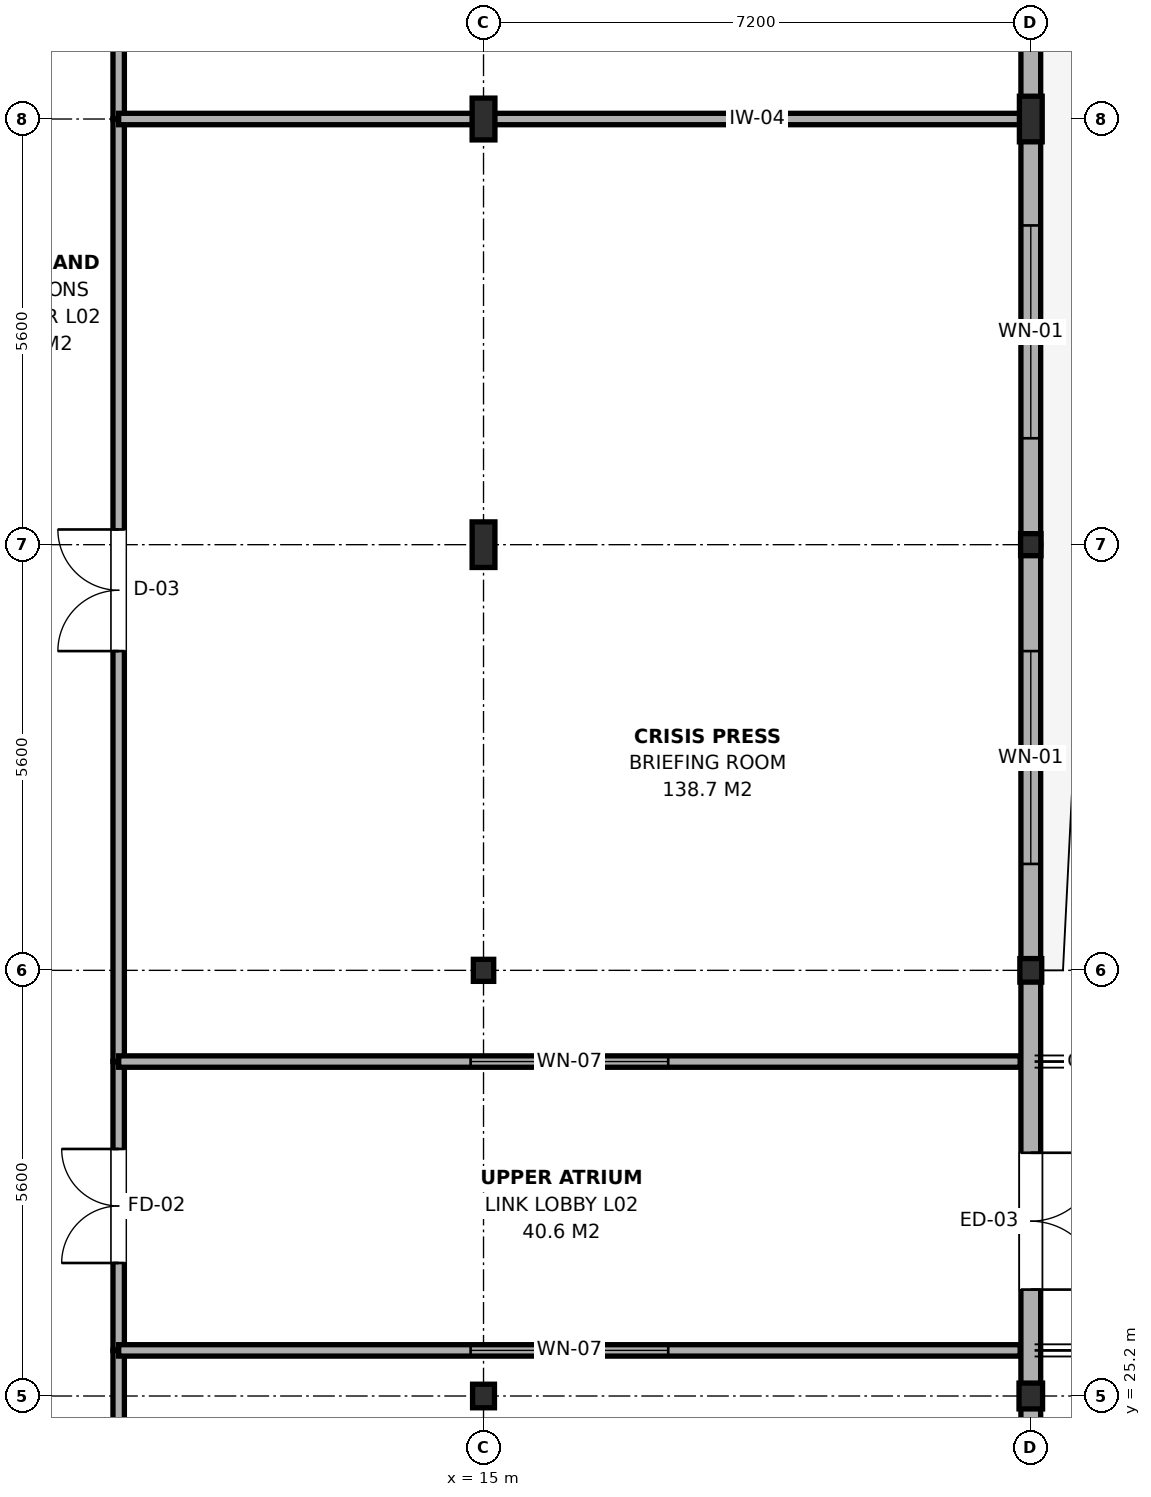
"""IFC4 building model, lengths in metres.
Left out: names, types, materials, properties, quantities, classifications, styles, units other than length and angle.
Written with IfcOpenShell. Run it as: python <this file> out.ifc"""

import sys

from ifc_helpers import new_model, si_unit, direction, frame, frame_2d, origin, origin_2d, place, context, subcontext, project, spatial, rectangle, i_section, extrude, element, fill, save


model = new_model("IFC4")
c1 = context("Model", 3, precision=1e-05, world=origin(), true_north=direction((0.0, 1.0)))
c2 = subcontext(c1, "Body", "Model", "MODEL_VIEW")
j1 = project(units=[si_unit("LENGTHUNIT", "METRE"), si_unit("PLANEANGLEUNIT", "RADIAN")], contexts=[c1])
p1 = place(None, origin())
s1 = spatial("IfcSite", under=j1, at=p1, CompositionType="ELEMENT")
p2 = place(p1, origin())
s2 = spatial("IfcBuilding", under=s1, at=p2, CompositionType="ELEMENT")
p3 = place(p2, frame((0.0, 0.0, 9.0)))
s3 = spatial("IfcBuildingStorey", under=s2, at=p3, CompositionType="ELEMENT", Elevation=9.0)
p4 = place(p3, frame((15.0, 25.2, 0.0), z_axis=(0.0, 0.0, 1.0), x_axis=(1.0, 0.0, 0.0)))
e1 = element("IfcColumn", 1, at=p4, inside=s3, PredefinedType="COLUMN", context=c2, shape_type="SweptSolid", body=[
    extrude(i_section(OverallWidth=0.288, OverallDepth=0.31, WebThickness=0.019, FlangeThickness=0.033, FilletRadius=0.024, at=origin_2d()), origin(), (0.0, 0.0, 1.0), 4.2),
])
p5 = place(p3, frame((15.0, 30.8, 0.0), z_axis=(0.0, 0.0, 1.0), x_axis=(1.0, 0.0, 0.0)))
e2 = element("IfcColumn", 2, at=p5, inside=s3, PredefinedType="COLUMN", context=c2, shape_type="SweptSolid", body=[
    extrude(i_section(OverallWidth=0.268, OverallDepth=0.29, WebThickness=0.018, FlangeThickness=0.032, FilletRadius=0.024, at=origin_2d()), origin(), (0.0, 0.0, 1.0), 4.2),
])
p6 = place(p3, frame((15.0, 36.4, 0.0), z_axis=(0.0, 0.0, 1.0), x_axis=(1.0, 0.0, 0.0)))
e3 = element("IfcColumn", 3, at=p6, inside=s3, PredefinedType="COLUMN", context=c2, shape_type="SweptSolid", body=[
    extrude(i_section(OverallWidth=0.3, OverallDepth=0.6, WebThickness=0.015, FlangeThickness=0.03, FilletRadius=0.027, at=origin_2d()), origin(), (0.0, 0.0, 1.0), 4.2),
])
p7 = place(p3, frame((15.0, 42.0, 0.0), z_axis=(0.0, 0.0, 1.0), x_axis=(1.0, 0.0, 0.0)))
e4 = element("IfcColumn", 4, at=p7, inside=s3, PredefinedType="COLUMN", context=c2, shape_type="SweptSolid", body=[
    extrude(i_section(OverallWidth=0.3, OverallDepth=0.55, WebThickness=0.015, FlangeThickness=0.029, FilletRadius=0.027, at=origin_2d()), origin(), (0.0, 0.0, 1.0), 4.2),
])
p8 = place(p3, frame((22.2, 25.2, 0.0), z_axis=(0.0, 0.0, 1.0), x_axis=(1.0, 0.0, 0.0)))
e5 = element("IfcColumn", 5, at=p8, inside=s3, PredefinedType="COLUMN", context=c2, shape_type="SweptSolid", body=[
    extrude(i_section(OverallWidth=0.31, OverallDepth=0.34, WebThickness=0.021, FlangeThickness=0.039, FilletRadius=0.027, at=origin_2d()), origin(), (0.0, 0.0, 1.0), 4.2),
])
p9 = place(p3, frame((22.2, 30.8, 0.0), z_axis=(0.0, 0.0, 1.0), x_axis=(1.0, 0.0, 0.0)))
e6 = element("IfcColumn", 6, at=p9, inside=s3, PredefinedType="COLUMN", context=c2, shape_type="SweptSolid", body=[
    extrude(i_section(OverallWidth=0.288, OverallDepth=0.31, WebThickness=0.019, FlangeThickness=0.033, FilletRadius=0.024, at=origin_2d()), origin(), (0.0, 0.0, 1.0), 4.2),
])
p10 = place(p3, frame((22.2, 36.4, 0.0), z_axis=(0.0, 0.0, 1.0), x_axis=(1.0, 0.0, 0.0)))
e7 = element("IfcColumn", 7, at=p10, inside=s3, PredefinedType="COLUMN", context=c2, shape_type="SweptSolid", body=[
    extrude(i_section(OverallWidth=0.268, OverallDepth=0.29, WebThickness=0.018, FlangeThickness=0.032, FilletRadius=0.024, at=origin_2d()), origin(), (0.0, 0.0, 1.0), 4.2),
])
p11 = place(p3, frame((22.2, 42.0, 0.0), z_axis=(0.0, 0.0, 1.0), x_axis=(1.0, 0.0, 0.0)))
e8 = element("IfcColumn", 8, at=p11, inside=s3, PredefinedType="COLUMN", context=c2, shape_type="SweptSolid", body=[
    extrude(i_section(OverallWidth=0.3, OverallDepth=0.6, WebThickness=0.015, FlangeThickness=0.03, FilletRadius=0.027, at=origin_2d()), origin(), (0.0, 0.0, 1.0), 4.2),
])
p12 = place(p3, frame((22.2, 17.27, 0.0), z_axis=(0.0, 0.0, 1.0), x_axis=(0.0, 1.0, 0.0)))
e9 = element("IfcWall", 9, at=p12, inside=s3, PredefinedType="SOLIDWALL", context=c2, shape_type="SweptSolid", body=[
    extrude(rectangle(XDim=7.93, YDim=0.26, at=frame_2d((3.965, 0.0))), origin(), (0.0, 0.0, 1.0), 3.525),
])
p13 = place(p12, frame((1.22, 0.0, 0.9)))
e10 = element("IfcOpeningElement", 10, at=p13, cuts=e9, PredefinedType="OPENING", context=c2, shape_type="SweptSolid", body=[
    extrude(rectangle(XDim=2.0, YDim=1.8, at=frame_2d((1.0, 0.9))), frame((0.0, 0.145, 0.0), z_axis=(0.0, -1.0, 0.0), x_axis=(1.0, 0.0, 0.0)), (0.0, 0.0, 1.0), 0.29),
])
p14 = place(p12, frame((4.71, 0.0, 0.9)))
e11 = element("IfcOpeningElement", 11, at=p14, cuts=e9, PredefinedType="OPENING", context=c2, shape_type="SweptSolid", body=[
    extrude(rectangle(XDim=2.0, YDim=1.8, at=frame_2d((1.0, 0.9))), frame((0.0, 0.145, 0.0), z_axis=(0.0, -1.0, 0.0), x_axis=(1.0, 0.0, 0.0)), (0.0, 0.0, 1.0), 0.29),
])
p15 = place(p3, frame((22.2, 25.2, 0.0), z_axis=(0.0, 0.0, 1.0), x_axis=(0.0, 1.0, 0.0)))
e12 = element("IfcWall", 12, at=p15, inside=s3, PredefinedType="SOLIDWALL", context=c2, shape_type="SweptSolid", body=[
    extrude(rectangle(XDim=5.6, YDim=0.26, at=frame_2d((2.8, 0.0))), origin(), (0.0, 0.0, 1.0), 3.525),
])
p16 = place(p15, frame((1.4, 0.0, 0.0)))
e13 = element("IfcOpeningElement", 13, at=p16, cuts=e12, PredefinedType="OPENING", context=c2, shape_type="SweptSolid", body=[
    extrude(rectangle(XDim=1.8, YDim=2.2, at=frame_2d((0.9, 1.1))), frame((0.0, 0.145, 0.0), z_axis=(0.0, -1.0, 0.0), x_axis=(1.0, 0.0, 0.0)), (0.0, 0.0, 1.0), 0.29),
])
p17 = place(p3, frame((22.2, 30.8, 0.0), z_axis=(0.0, 0.0, 1.0), x_axis=(0.0, 1.0, 0.0)))
e14 = element("IfcWall", 14, at=p17, inside=s3, PredefinedType="SOLIDWALL", context=c2, shape_type="SweptSolid", body=[
    extrude(rectangle(XDim=5.6, YDim=0.26, at=frame_2d((2.8, 0.0))), origin(), (0.0, 0.0, 1.0), 3.375),
])
p18 = place(p17, frame((1.4, 0.0, 0.9)))
e15 = element("IfcOpeningElement", 15, at=p18, cuts=e14, PredefinedType="OPENING", context=c2, shape_type="SweptSolid", body=[
    extrude(rectangle(XDim=2.8, YDim=2.2, at=frame_2d((1.4, 1.1))), frame((0.0, 0.145, 0.0), z_axis=(0.0, -1.0, 0.0), x_axis=(1.0, 0.0, 0.0)), (0.0, 0.0, 1.0), 0.29),
])
p19 = place(p3, frame((22.2, 36.4, 0.0), z_axis=(0.0, 0.0, 1.0), x_axis=(0.0, 1.0, 0.0)))
e16 = element("IfcWall", 16, at=p19, inside=s3, PredefinedType="SOLIDWALL", context=c2, shape_type="SweptSolid", body=[
    extrude(rectangle(XDim=5.6, YDim=0.26, at=frame_2d((2.8, 0.0))), origin(), (0.0, 0.0, 1.0), 3.375),
])
p20 = place(p19, frame((1.4, 0.0, 0.9)))
e17 = element("IfcOpeningElement", 17, at=p20, cuts=e16, PredefinedType="OPENING", context=c2, shape_type="SweptSolid", body=[
    extrude(rectangle(XDim=2.8, YDim=2.2, at=frame_2d((1.4, 1.1))), frame((0.0, 0.145, 0.0), z_axis=(0.0, -1.0, 0.0), x_axis=(1.0, 0.0, 0.0)), (0.0, 0.0, 1.0), 0.29),
])
p21 = place(p3, frame((22.2, 42.0, 0.0), z_axis=(0.0, 0.0, 1.0), x_axis=(0.0, 1.0, 0.0)))
e18 = element("IfcWall", 18, at=p21, inside=s3, PredefinedType="SOLIDWALL", context=c2, shape_type="SweptSolid", body=[
    extrude(rectangle(XDim=5.6, YDim=0.26, at=frame_2d((2.8, 0.0))), origin(), (0.0, 0.0, 1.0), 3.425),
])
p22 = place(p21, frame((1.4, 0.0, 0.9)))
e19 = element("IfcOpeningElement", 19, at=p22, cuts=e18, PredefinedType="OPENING", context=c2, shape_type="SweptSolid", body=[
    extrude(rectangle(XDim=2.8, YDim=2.2, at=frame_2d((1.4, 1.1))), frame((0.0, 0.145, 0.0), z_axis=(0.0, -1.0, 0.0), x_axis=(1.0, 0.0, 0.0)), (0.0, 0.0, 1.0), 0.29),
])
p23 = place(p3, frame((10.2, 17.56, 0.0), z_axis=(0.0, 0.0, 1.0), x_axis=(0.0, 1.0, 0.0)))
e20 = element("IfcWall", 20, at=p23, inside=s3, PredefinedType="PARTITIONING", context=c2, shape_type="SweptSolid", body=[
    extrude(rectangle(XDim=8.24, YDim=0.15, at=frame_2d((4.12, 0.0))), origin(), (0.0, 0.0, 1.0), 3.475),
])
p24 = place(p23, frame((3.595, 0.0, 0.0)))
e21 = element("IfcOpeningElement", 21, at=p24, cuts=e20, PredefinedType="OPENING", context=c2, shape_type="SweptSolid", body=[
    extrude(rectangle(XDim=1.05, YDim=2.15, at=frame_2d((0.525, 1.075))), frame((0.0, 0.09, 0.0), z_axis=(0.0, -1.0, 0.0), x_axis=(1.0, 0.0, 0.0)), (0.0, 0.0, 1.0), 0.18),
])
p25 = place(p3, frame((10.2, 25.8, 0.0), z_axis=(0.0, 0.0, 1.0), x_axis=(0.0, 1.0, 0.0)))
e22 = element("IfcWall", 22, at=p25, inside=s3, PredefinedType="PARTITIONING", context=c2, shape_type="SweptSolid", body=[
    extrude(rectangle(XDim=3.8, YDim=0.15, at=frame_2d((1.9, 0.0))), origin(), (0.0, 0.0, 1.0), 3.975),
])
p26 = place(p25, frame((1.15, 0.0, 0.0)))
e23 = element("IfcOpeningElement", 23, at=p26, cuts=e22, PredefinedType="OPENING", context=c2, shape_type="SweptSolid", body=[
    extrude(rectangle(XDim=1.5, YDim=2.15, at=frame_2d((0.75, 1.075))), frame((0.0, 0.09, 0.0), z_axis=(0.0, -1.0, 0.0), x_axis=(1.0, 0.0, 0.0)), (0.0, 0.0, 1.0), 0.18),
])
p27 = place(p3, frame((10.2, 25.8, 0.0), z_axis=(0.0, 0.0, 1.0), x_axis=(1.0, 0.0, 0.0)))
e24 = element("IfcWall", 24, at=p27, inside=s3, PredefinedType="PARTITIONING", context=c2, shape_type="SweptSolid", body=[
    extrude(rectangle(XDim=11.86, YDim=0.15, at=frame_2d((5.93, 0.0))), origin(), (0.0, 0.0, 1.0), 3.375),
])
p28 = place(p27, frame((4.63, 0.0, 0.95)))
e25 = element("IfcOpeningElement", 25, at=p28, cuts=e24, PredefinedType="OPENING", context=c2, shape_type="SweptSolid", body=[
    extrude(rectangle(XDim=2.6, YDim=1.5, at=frame_2d((1.3, 0.75))), frame((0.0, 0.09, 0.0), z_axis=(0.0, -1.0, 0.0), x_axis=(1.0, 0.0, 0.0)), (0.0, 0.0, 1.0), 0.18),
])
p29 = place(p3, frame((10.2, 29.6, 0.0), z_axis=(0.0, 0.0, 1.0), x_axis=(0.0, 1.0, 0.0)))
e26 = element("IfcWall", 26, at=p29, inside=s3, PredefinedType="PARTITIONING", context=c2, shape_type="SweptSolid", body=[
    extrude(rectangle(XDim=12.4, YDim=0.15, at=frame_2d((6.2, 0.0))), origin(), (0.0, 0.0, 1.0), 3.375),
])
p30 = place(p29, frame((5.4, 0.0, 0.0)))
e27 = element("IfcOpeningElement", 27, at=p30, cuts=e26, PredefinedType="OPENING", context=c2, shape_type="SweptSolid", body=[
    extrude(rectangle(XDim=1.6, YDim=2.15, at=frame_2d((0.8, 1.075))), frame((0.0, 0.09, 0.0), z_axis=(0.0, -1.0, 0.0), x_axis=(1.0, 0.0, 0.0)), (0.0, 0.0, 1.0), 0.18),
])
p31 = place(p3, frame((10.2, 29.6, 0.0), z_axis=(0.0, 0.0, 1.0), x_axis=(1.0, 0.0, 0.0)))
e28 = element("IfcWall", 28, at=p31, inside=s3, PredefinedType="PARTITIONING", context=c2, shape_type="SweptSolid", body=[
    extrude(rectangle(XDim=11.86, YDim=0.15, at=frame_2d((5.93, 0.0))), origin(), (0.0, 0.0, 1.0), 3.375),
])
p32 = place(p31, frame((4.63, 0.0, 0.95)))
e29 = element("IfcOpeningElement", 29, at=p32, cuts=e28, PredefinedType="OPENING", context=c2, shape_type="SweptSolid", body=[
    extrude(rectangle(XDim=2.6, YDim=1.5, at=frame_2d((1.3, 0.75))), frame((0.0, 0.09, 0.0), z_axis=(0.0, -1.0, 0.0), x_axis=(1.0, 0.0, 0.0)), (0.0, 0.0, 1.0), 0.18),
])
p33 = place(p3, frame((10.2, 42.0, 0.0), z_axis=(0.0, 0.0, 1.0), x_axis=(0.0, 1.0, 0.0)))
e30 = element("IfcWall", 30, at=p33, inside=s3, PredefinedType="PARTITIONING", context=c2, shape_type="SweptSolid", body=[
    extrude(rectangle(XDim=24.6, YDim=0.15, at=frame_2d((12.3, 0.0))), origin(), (0.0, 0.0, 1.0), 3.375),
])
p34 = place(p33, frame((11.775, 0.0, 0.0)))
e31 = element("IfcOpeningElement", 31, at=p34, cuts=e30, PredefinedType="OPENING", context=c2, shape_type="SweptSolid", body=[
    extrude(rectangle(XDim=1.05, YDim=2.15, at=frame_2d((0.525, 1.075))), frame((0.0, 0.09, 0.0), z_axis=(0.0, -1.0, 0.0), x_axis=(1.0, 0.0, 0.0)), (0.0, 0.0, 1.0), 0.18),
])
p35 = place(p33, frame((4.85, 0.0, 0.95)))
e32 = element("IfcOpeningElement", 32, at=p35, cuts=e30, PredefinedType="OPENING", context=c2, shape_type="SweptSolid", body=[
    extrude(rectangle(XDim=2.6, YDim=1.5, at=frame_2d((1.3, 0.75))), frame((0.0, 0.09, 0.0), z_axis=(0.0, -1.0, 0.0), x_axis=(1.0, 0.0, 0.0)), (0.0, 0.0, 1.0), 0.18),
])
p36 = place(p33, frame((17.15, 0.0, 0.95)))
e33 = element("IfcOpeningElement", 33, at=p36, cuts=e30, PredefinedType="OPENING", context=c2, shape_type="SweptSolid", body=[
    extrude(rectangle(XDim=2.6, YDim=1.5, at=frame_2d((1.3, 0.75))), frame((0.0, 0.09, 0.0), z_axis=(0.0, -1.0, 0.0), x_axis=(1.0, 0.0, 0.0)), (0.0, 0.0, 1.0), 0.18),
])
p37 = place(p3, frame((10.2, 42.0, 0.0), z_axis=(0.0, 0.0, 1.0), x_axis=(1.0, 0.0, 0.0)))
e34 = element("IfcWall", 34, at=p37, inside=s3, PredefinedType="PARTITIONING", context=c2, shape_type="SweptSolid", body=[
    extrude(rectangle(XDim=11.86, YDim=0.15, at=frame_2d((5.93, 0.0))), origin(), (0.0, 0.0, 1.0), 3.525),
])
p38 = place(p16, frame((1.8, 0.0, 0.0), z_axis=(0.0, 0.0, 1.0), x_axis=(-1.0, 0.0, 0.0)))
e35 = element("IfcDoor", 35, at=p38, inside=s3, OperationType="DOUBLE_DOOR_SINGLE_SWING", PredefinedType="DOOR", context=c2, shape_type="SweptSolid", body=[
    extrude(rectangle(XDim=1.8, YDim=2.2, at=frame_2d((0.9, 1.1))), frame((0.0, 0.025, 0.0), z_axis=(0.0, -1.0, 0.0), x_axis=(1.0, 0.0, 0.0)), (0.0, 0.0, 1.0), 0.05),
])
fill(e13, e35)
p39 = place(p18, origin())
e36 = element("IfcWindow", 36, at=p39, inside=s3, PartitioningType="SINGLE_PANEL", PredefinedType="WINDOW", context=c2, shape_type="SweptSolid", body=[
    extrude(rectangle(XDim=2.8, YDim=2.2, at=frame_2d((1.4, 1.1))), frame((0.0, 0.03, 0.0), z_axis=(0.0, -1.0, 0.0), x_axis=(1.0, 0.0, 0.0)), (0.0, 0.0, 1.0), 0.06),
])
fill(e15, e36)
p40 = place(p20, origin())
e37 = element("IfcWindow", 37, at=p40, inside=s3, PartitioningType="SINGLE_PANEL", PredefinedType="WINDOW", context=c2, shape_type="SweptSolid", body=[
    extrude(rectangle(XDim=2.8, YDim=2.2, at=frame_2d((1.4, 1.1))), frame((0.0, 0.03, 0.0), z_axis=(0.0, -1.0, 0.0), x_axis=(1.0, 0.0, 0.0)), (0.0, 0.0, 1.0), 0.06),
])
fill(e17, e37)
p41 = place(p26, origin())
e38 = element("IfcDoor", 38, at=p41, inside=s3, OperationType="DOUBLE_DOOR_SINGLE_SWING", PredefinedType="DOOR", context=c2, shape_type="SweptSolid", body=[
    extrude(rectangle(XDim=1.5, YDim=2.15, at=frame_2d((0.75, 1.075))), frame((0.0, 0.025, 0.0), z_axis=(0.0, -1.0, 0.0), x_axis=(1.0, 0.0, 0.0)), (0.0, 0.0, 1.0), 0.05),
])
fill(e23, e38)
p42 = place(p28, origin())
e39 = element("IfcWindow", 39, at=p42, inside=s3, PartitioningType="SINGLE_PANEL", PredefinedType="WINDOW", context=c2, shape_type="SweptSolid", body=[
    extrude(rectangle(XDim=2.6, YDim=1.5, at=frame_2d((1.3, 0.75))), frame((0.0, 0.03, 0.0), z_axis=(0.0, -1.0, 0.0), x_axis=(1.0, 0.0, 0.0)), (0.0, 0.0, 1.0), 0.06),
])
fill(e25, e39)
p43 = place(p30, origin())
e40 = element("IfcDoor", 40, at=p43, inside=s3, OperationType="DOUBLE_DOOR_SINGLE_SWING", PredefinedType="DOOR", context=c2, shape_type="SweptSolid", body=[
    extrude(rectangle(XDim=1.6, YDim=2.15, at=frame_2d((0.8, 1.075))), frame((0.0, 0.025, 0.0), z_axis=(0.0, -1.0, 0.0), x_axis=(1.0, 0.0, 0.0)), (0.0, 0.0, 1.0), 0.05),
])
fill(e27, e40)
p44 = place(p32, origin())
e41 = element("IfcWindow", 41, at=p44, inside=s3, PartitioningType="SINGLE_PANEL", PredefinedType="WINDOW", context=c2, shape_type="SweptSolid", body=[
    extrude(rectangle(XDim=2.6, YDim=1.5, at=frame_2d((1.3, 0.75))), frame((0.0, 0.03, 0.0), z_axis=(0.0, -1.0, 0.0), x_axis=(1.0, 0.0, 0.0)), (0.0, 0.0, 1.0), 0.06),
])
fill(e29, e41)
save(model, sys.argv[1])
